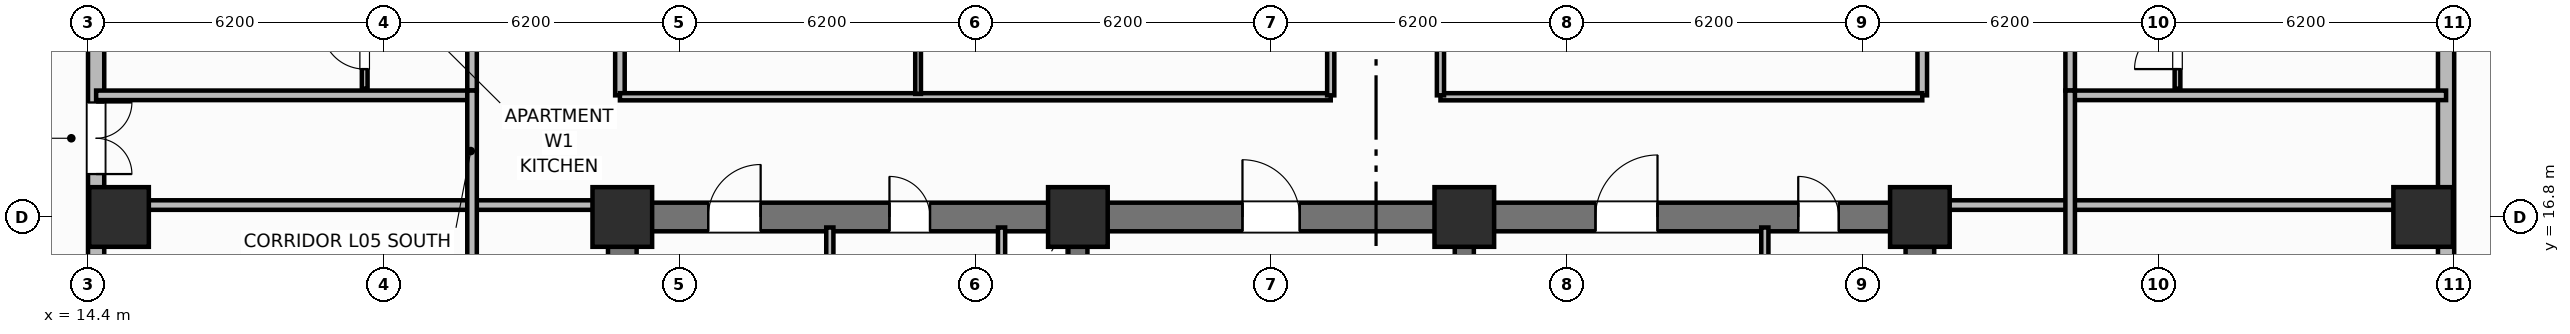
"""IFC4 building model, lengths in metres.
Left out: names, types, materials, properties, quantities, classifications, styles, units other than length and angle.
Written with IfcOpenShell. Run it as: python <this file> out.ifc"""

import sys

from ifc_helpers import new_model, si_unit, direction, frame, frame_2d, origin, origin_2d, place, context, subcontext, project, spatial, rectangle, extrude, element, fill, save


model = new_model("IFC4")
c1 = context("Model", 3, precision=1e-05, world=origin(), true_north=direction((0.0, 1.0)))
c2 = subcontext(c1, "Body", "Model", "MODEL_VIEW")
j1 = project(units=[si_unit("LENGTHUNIT", "METRE"), si_unit("PLANEANGLEUNIT", "RADIAN")], contexts=[c1])
p1 = place(None, origin())
s1 = spatial("IfcSite", under=j1, at=p1, CompositionType="ELEMENT")
p2 = place(p1, origin())
s2 = spatial("IfcBuilding", under=s1, at=p2, CompositionType="ELEMENT")
p3 = place(p2, frame((0.0, 0.0, 24.6)))
s3 = spatial("IfcBuildingStorey", under=s2, at=p3, CompositionType="ELEMENT", Elevation=24.6)
for number, where, z_axis, x_axis in (
    (1, (25.6, 10.9, 0.0), (0.0, 0.0, 1.0), (0.0, 1.0, 0.0)),
    (2, (52.8, 10.9, 0.0), (0.0, 0.0, 1.0), (0.0, 1.0, 0.0)),
):
    element("IfcWall", number, at=place(p3, frame(where, z_axis=z_axis, x_axis=x_axis)), inside=s3, PredefinedType="SHEAR", context=c2, shape_type="SweptSolid", body=[
        extrude(rectangle(XDim=5.6, YDim=0.6, at=frame_2d((2.8, 0.0))), origin(), (0.0, 0.0, 1.0), 4.2),
    ])
p4 = place(p3, frame((25.6, 16.8, 0.0), z_axis=(0.0, 0.0, 1.0), x_axis=(1.0, 0.0, 0.0)))
e3 = element("IfcWall", 3, at=p4, inside=s3, PredefinedType="SHEAR", context=c2, shape_type="SweptSolid", body=[
    extrude(rectangle(XDim=27.2, YDim=0.6, at=frame_2d((13.6, 0.0))), origin(), (0.0, 0.0, 1.0), 4.2),
])
p5 = place(p4, frame((1.8, 0.0, 0.0)))
e4 = element("IfcOpeningElement", 4, at=p5, cuts=e3, PredefinedType="OPENING", context=c2, shape_type="SweptSolid", body=[
    extrude(rectangle(XDim=1.1, YDim=2.15, at=frame_2d((0.55, 1.075))), frame((0.0, 0.31, 0.0), z_axis=(0.0, -1.0, 0.0), x_axis=(1.0, 0.0, 0.0)), (0.0, 0.0, 1.0), 0.62),
])
p6 = place(p4, frame((5.6, 0.0, 0.0)))
e5 = element("IfcOpeningElement", 5, at=p6, cuts=e3, PredefinedType="OPENING", context=c2, shape_type="SweptSolid", body=[
    extrude(rectangle(XDim=0.85, YDim=2.1, at=frame_2d((0.425, 1.05))), frame((0.0, 0.31, 0.0), z_axis=(0.0, -1.0, 0.0), x_axis=(1.0, 0.0, 0.0)), (0.0, 0.0, 1.0), 0.62),
])
p7 = place(p4, frame((13.0, 0.0, 0.0)))
e6 = element("IfcOpeningElement", 6, at=p7, cuts=e3, PredefinedType="OPENING", context=c2, shape_type="SweptSolid", body=[
    extrude(rectangle(XDim=1.2, YDim=2.15, at=frame_2d((0.6, 1.075))), frame((0.0, 0.31, 0.0), z_axis=(0.0, -1.0, 0.0), x_axis=(1.0, 0.0, 0.0)), (0.0, 0.0, 1.0), 0.62),
])
p8 = place(p4, frame((20.4, 0.0, 0.0)))
e7 = element("IfcOpeningElement", 7, at=p8, cuts=e3, PredefinedType="OPENING", context=c2, shape_type="SweptSolid", body=[
    extrude(rectangle(XDim=1.3, YDim=2.2, at=frame_2d((0.65, 1.1))), frame((0.0, 0.31, 0.0), z_axis=(0.0, -1.0, 0.0), x_axis=(1.0, 0.0, 0.0)), (0.0, 0.0, 1.0), 0.62),
])
p9 = place(p4, frame((24.65, 0.0, 0.0)))
e8 = element("IfcOpeningElement", 8, at=p9, cuts=e3, PredefinedType="OPENING", context=c2, shape_type="SweptSolid", body=[
    extrude(rectangle(XDim=0.85, YDim=2.1, at=frame_2d((0.425, 1.05))), frame((0.0, 0.31, 0.0), z_axis=(0.0, -1.0, 0.0), x_axis=(1.0, 0.0, 0.0)), (0.0, 0.0, 1.0), 0.62),
])
for number, where, z_axis, x_axis in (
    (9, (35.15, 10.9, 0.0), (0.0, 0.0, 1.0), (0.0, 1.0, 0.0)),
    (10, (43.25, 10.9, 0.0), (0.0, 0.0, 1.0), (0.0, 1.0, 0.0)),
):
    element("IfcWall", number, at=place(p3, frame(where, z_axis=z_axis, x_axis=x_axis)), inside=s3, PredefinedType="SHEAR", context=c2, shape_type="SweptSolid", body=[
        extrude(rectangle(XDim=5.6, YDim=0.4, at=frame_2d((2.8, 0.0))), origin(), (0.0, 0.0, 1.0), 4.2),
    ])
for number, where, z_axis, x_axis in (
    (11, (25.6, 16.8, 0.0), (0.0, 0.0, 1.0), (1.0, 0.0, 0.0)),
    (12, (35.15, 16.8, 0.0), (0.0, 0.0, 1.0), (1.0, 0.0, 0.0)),
    (13, (43.25, 16.8, 0.0), (0.0, 0.0, 1.0), (1.0, 0.0, 0.0)),
    (14, (52.8, 16.8, 0.0), (0.0, 0.0, 1.0), (1.0, 0.0, 0.0)),
    (15, (15.05, 16.8, 0.0), (0.0, 0.0, 1.0), (1.0, 0.0, 0.0)),
    (16, (63.35, 16.8, 0.0), (0.0, 0.0, 1.0), (1.0, 0.0, 0.0)),
):
    element("IfcColumn", number, at=place(p3, frame(where, z_axis=z_axis, x_axis=x_axis)), inside=s3, PredefinedType="COLUMN", context=c2, shape_type="SweptSolid", body=[
        extrude(rectangle(XDim=1.25, YDim=1.25, at=origin_2d()), origin(), (0.0, 0.0, 1.0), 4.2),
    ])
p10 = place(p3, frame((63.83, 9.0, 0.0), z_axis=(0.0, 0.0, 1.0), x_axis=(0.0, 1.0, 0.0)))
e17 = element("IfcWall", 17, at=p10, inside=s3, PredefinedType="SOLIDWALL", context=c2, shape_type="SweptSolid", body=[
    extrude(rectangle(XDim=14.8, YDim=0.34, at=frame_2d((7.4, 0.0))), origin(), (0.0, 0.0, 1.0), 3.2),
])
p11 = place(p10, frame((4.913, 0.0, 0.85)))
e18 = element("IfcOpeningElement", 18, at=p11, cuts=e17, PredefinedType="OPENING", context=c2, shape_type="SweptSolid", body=[
    extrude(rectangle(XDim=1.6, YDim=1.9, at=frame_2d((0.8, 0.95))), frame((0.0, 0.18, 0.0), z_axis=(0.0, -1.0, 0.0), x_axis=(1.0, 0.0, 0.0)), (0.0, 0.0, 1.0), 0.36),
])
p12 = place(p10, frame((11.663, 0.0, 0.85)))
e19 = element("IfcOpeningElement", 19, at=p12, cuts=e17, PredefinedType="OPENING", context=c2, shape_type="SweptSolid", body=[
    extrude(rectangle(XDim=1.6, YDim=1.9, at=frame_2d((0.8, 0.95))), frame((0.0, 0.18, 0.0), z_axis=(0.0, -1.0, 0.0), x_axis=(1.0, 0.0, 0.0)), (0.0, 0.0, 1.0), 0.36),
])
p13 = place(p3, frame((14.57, 23.8, 0.0), z_axis=(0.0, 0.0, 1.0), x_axis=(0.0, -1.0, 0.0)))
e20 = element("IfcWall", 20, at=p13, inside=s3, PredefinedType="SOLIDWALL", context=c2, shape_type="SweptSolid", body=[
    extrude(rectangle(XDim=14.8, YDim=0.34, at=frame_2d((7.4, 0.0))), origin(), (0.0, 0.0, 1.0), 3.2),
])
p14 = place(p13, frame((1.438, 0.0, 0.85)))
e21 = element("IfcOpeningElement", 21, at=p14, cuts=e20, PredefinedType="OPENING", context=c2, shape_type="SweptSolid", body=[
    extrude(rectangle(XDim=1.8, YDim=1.85, at=frame_2d((0.9, 0.925))), frame((0.0, 0.18, 0.0), z_axis=(0.0, -1.0, 0.0), x_axis=(1.0, 0.0, 0.0)), (0.0, 0.0, 1.0), 0.36),
])
p15 = place(p13, frame((4.6, 0.0, 0.0)))
e22 = element("IfcOpeningElement", 22, at=p15, cuts=e20, PredefinedType="OPENING", context=c2, shape_type="SweptSolid", body=[
    extrude(rectangle(XDim=1.5, YDim=2.1, at=frame_2d((0.75, 1.05))), frame((0.0, 0.18, 0.0), z_axis=(0.0, -1.0, 0.0), x_axis=(1.0, 0.0, 0.0)), (0.0, 0.0, 1.0), 0.36),
])
p16 = place(p13, frame((8.538, 0.0, 0.85)))
e23 = element("IfcOpeningElement", 23, at=p16, cuts=e20, PredefinedType="OPENING", context=c2, shape_type="SweptSolid", body=[
    extrude(rectangle(XDim=1.8, YDim=1.85, at=frame_2d((0.9, 0.925))), frame((0.0, 0.18, 0.0), z_axis=(0.0, -1.0, 0.0), x_axis=(1.0, 0.0, 0.0)), (0.0, 0.0, 1.0), 0.36),
])
p17 = place(p3, frame((29.95, 14.5, 0.0), z_axis=(0.0, 0.0, 1.0), x_axis=(0.0, 1.0, 0.0)))
e24 = element("IfcWall", 24, at=p17, inside=s3, PredefinedType="PARTITIONING", context=c2, shape_type="SweptSolid", body=[
    extrude(rectangle(XDim=2.08, YDim=0.15, at=frame_2d((1.04, 0.0))), origin(), (0.0, 0.0, 1.0), 3.03),
])
p18 = place(p3, frame((33.55, 14.5, 0.0), z_axis=(0.0, 0.0, 1.0), x_axis=(0.0, 1.0, 0.0)))
e25 = element("IfcWall", 25, at=p18, inside=s3, PredefinedType="PARTITIONING", context=c2, shape_type="SweptSolid", body=[
    extrude(rectangle(XDim=2.08, YDim=0.15, at=frame_2d((1.04, 0.0))), origin(), (0.0, 0.0, 1.0), 3.03),
])
p19 = place(p18, frame((0.55, 0.0, 0.0)))
e26 = element("IfcOpeningElement", 26, at=p19, cuts=e25, PredefinedType="OPENING", context=c2, shape_type="SweptSolid", body=[
    extrude(rectangle(XDim=0.85, YDim=2.05, at=frame_2d((0.425, 1.025))), frame((0.0, 0.085, 0.0), z_axis=(0.0, -1.0, 0.0), x_axis=(1.0, 0.0, 0.0)), (0.0, 0.0, 1.0), 0.17),
])
p20 = place(p3, frame((49.55, 13.7, 0.0), z_axis=(0.0, 0.0, 1.0), x_axis=(0.0, 1.0, 0.0)))
e27 = element("IfcWall", 27, at=p20, inside=s3, PredefinedType="PARTITIONING", context=c2, shape_type="SweptSolid", body=[
    extrude(rectangle(XDim=2.88, YDim=0.15, at=frame_2d((1.44, 0.0))), origin(), (0.0, 0.0, 1.0), 3.03),
])
for number, where, z_axis, x_axis in (
    (28, (25.55, 19.35, 0.0), (0.0, 0.0, 1.0), (0.0, 1.0, 0.0)),
    (29, (52.85, 19.35, 0.0), (0.0, 0.0, 1.0), (0.0, 1.0, 0.0)),
):
    element("IfcWall", number, at=place(p3, frame(where, z_axis=z_axis, x_axis=x_axis)), inside=s3, PredefinedType="PARTITIONING", context=c2, shape_type="SweptSolid", body=[
        extrude(rectangle(XDim=18.42, YDim=0.2, at=frame_2d((9.21, 0.0))), origin(), (0.0, 0.0, 1.0), 3.03),
    ])
p21 = place(p3, frame((14.57, 17.05, 0.0), z_axis=(0.0, 0.0, 1.0), x_axis=(1.0, 0.0, 0.0)))
e30 = element("IfcWall", 30, at=p21, inside=s3, PredefinedType="PARTITIONING", context=c2, shape_type="SweptSolid", body=[
    extrude(rectangle(XDim=10.73, YDim=0.2, at=frame_2d((5.365, 0.0))), origin(), (0.0, 0.0, 1.0), 3.03),
])
p22 = place(p3, frame((14.57, 19.35, 0.0), z_axis=(0.0, 0.0, 1.0), x_axis=(1.0, 0.0, 0.0)))
e31 = element("IfcWall", 31, at=p22, inside=s3, PredefinedType="PARTITIONING", context=c2, shape_type="SweptSolid", body=[
    extrude(rectangle(XDim=7.88, YDim=0.2, at=frame_2d((3.94, 0.0))), origin(), (0.0, 0.0, 1.0), 3.03),
])
p23 = place(p3, frame((53.1, 17.05, 0.0), z_axis=(0.0, 0.0, 1.0), x_axis=(1.0, 0.0, 0.0)))
e32 = element("IfcWall", 32, at=p23, inside=s3, PredefinedType="PARTITIONING", context=c2, shape_type="SweptSolid", body=[
    extrude(rectangle(XDim=10.73, YDim=0.2, at=frame_2d((5.365, 0.0))), origin(), (0.0, 0.0, 1.0), 3.03),
])
p24 = place(p3, frame((55.95, 19.35, 0.0), z_axis=(0.0, 0.0, 1.0), x_axis=(1.0, 0.0, 0.0)))
e33 = element("IfcWall", 33, at=p24, inside=s3, PredefinedType="PARTITIONING", context=c2, shape_type="SweptSolid", body=[
    extrude(rectangle(XDim=7.88, YDim=0.2, at=frame_2d((3.94, 0.0))), origin(), (0.0, 0.0, 1.0), 3.03),
])
p25 = place(p3, frame((25.55, 19.32, 0.0), z_axis=(0.0, 0.0, 1.0), x_axis=(1.0, 0.0, 0.0)))
e34 = element("IfcWall", 34, at=p25, inside=s3, PredefinedType="PARTITIONING", context=c2, shape_type="SweptSolid", body=[
    extrude(rectangle(XDim=14.9, YDim=0.15, at=frame_2d((7.45, 0.0))), origin(), (0.0, 0.0, 1.0), 3.03),
])
p26 = place(p3, frame((42.75, 19.32, 0.0), z_axis=(0.0, 0.0, 1.0), x_axis=(1.0, 0.0, 0.0)))
e35 = element("IfcWall", 35, at=p26, inside=s3, PredefinedType="PARTITIONING", context=c2, shape_type="SweptSolid", body=[
    extrude(rectangle(XDim=10.1, YDim=0.15, at=frame_2d((5.05, 0.0))), origin(), (0.0, 0.0, 1.0), 3.03),
])
p27 = place(p3, frame((31.8, 19.38, 0.0), z_axis=(0.0, 0.0, 1.0), x_axis=(0.0, 1.0, 0.0)))
e36 = element("IfcWall", 36, at=p27, inside=s3, PredefinedType="PARTITIONING", context=c2, shape_type="SweptSolid", body=[
    extrude(rectangle(XDim=8.77, YDim=0.12, at=frame_2d((4.385, 0.0))), origin(), (0.0, 0.0, 1.0), 3.03),
])
p28 = place(p27, frame((2.2, 0.0, 0.0)))
e37 = element("IfcOpeningElement", 37, at=p28, cuts=e36, PredefinedType="OPENING", context=c2, shape_type="SweptSolid", body=[
    extrude(rectangle(XDim=0.9, YDim=2.1, at=frame_2d((0.45, 1.05))), frame((0.0, 0.07, 0.0), z_axis=(0.0, -1.0, 0.0), x_axis=(1.0, 0.0, 0.0)), (0.0, 0.0, 1.0), 0.14),
])
p29 = place(p3, frame((40.45, 19.35, 0.0), z_axis=(0.0, 0.0, 1.0), x_axis=(0.0, 1.0, 0.0)))
e38 = element("IfcWall", 38, at=p29, inside=s3, PredefinedType="PARTITIONING", context=c2, shape_type="SweptSolid", body=[
    extrude(rectangle(XDim=18.42, YDim=0.15, at=frame_2d((9.21, 0.0))), origin(), (0.0, 0.0, 1.0), 3.03),
])
p30 = place(p29, frame((2.4, 0.0, 0.0)))
e39 = element("IfcOpeningElement", 39, at=p30, cuts=e38, PredefinedType="OPENING", context=c2, shape_type="SweptSolid", body=[
    extrude(rectangle(XDim=1.0, YDim=2.15, at=frame_2d((0.5, 1.075))), frame((0.0, 0.085, 0.0), z_axis=(0.0, -1.0, 0.0), x_axis=(1.0, 0.0, 0.0)), (0.0, 0.0, 1.0), 0.17),
])
p31 = place(p29, frame((11.4, 0.0, 0.0)))
e40 = element("IfcOpeningElement", 40, at=p31, cuts=e38, PredefinedType="OPENING", context=c2, shape_type="SweptSolid", body=[
    extrude(rectangle(XDim=1.0, YDim=2.15, at=frame_2d((0.5, 1.075))), frame((0.0, 0.085, 0.0), z_axis=(0.0, -1.0, 0.0), x_axis=(1.0, 0.0, 0.0)), (0.0, 0.0, 1.0), 0.17),
])
p32 = place(p3, frame((42.75, 19.35, 0.0), z_axis=(0.0, 0.0, 1.0), x_axis=(0.0, 1.0, 0.0)))
e41 = element("IfcWall", 41, at=p32, inside=s3, PredefinedType="PARTITIONING", context=c2, shape_type="SweptSolid", body=[
    extrude(rectangle(XDim=18.42, YDim=0.15, at=frame_2d((9.21, 0.0))), origin(), (0.0, 0.0, 1.0), 3.03),
])
p33 = place(p32, frame((5.5, 0.0, 0.0)))
e42 = element("IfcOpeningElement", 42, at=p33, cuts=e41, PredefinedType="OPENING", context=c2, shape_type="SweptSolid", body=[
    extrude(rectangle(XDim=1.0, YDim=2.15, at=frame_2d((0.5, 1.075))), frame((0.0, 0.085, 0.0), z_axis=(0.0, -1.0, 0.0), x_axis=(1.0, 0.0, 0.0)), (0.0, 0.0, 1.0), 0.17),
])
p34 = place(p3, frame((20.2, 19.49, 0.0), z_axis=(0.0, 0.0, 1.0), x_axis=(0.0, 1.0, 0.0)))
e43 = element("IfcWall", 43, at=p34, inside=s3, PredefinedType="PARTITIONING", context=c2, shape_type="SweptSolid", body=[
    extrude(rectangle(XDim=13.095, YDim=0.12, at=frame_2d((6.547, 0.0))), origin(), (0.0, 0.0, 1.0), 3.03),
])
p35 = place(p34, frame((0.41, 0.0, 0.0)))
e44 = element("IfcOpeningElement", 44, at=p35, cuts=e43, PredefinedType="OPENING", context=c2, shape_type="SweptSolid", body=[
    extrude(rectangle(XDim=0.9, YDim=2.1, at=frame_2d((0.45, 1.05))), frame((0.0, 0.07, 0.0), z_axis=(0.0, -1.0, 0.0), x_axis=(1.0, 0.0, 0.0)), (0.0, 0.0, 1.0), 0.14),
])
p36 = place(p34, frame((11.36, 0.0, 0.0)))
e45 = element("IfcOpeningElement", 45, at=p36, cuts=e43, PredefinedType="OPENING", context=c2, shape_type="SweptSolid", body=[
    extrude(rectangle(XDim=0.82, YDim=2.08, at=frame_2d((0.41, 1.04))), frame((0.0, 0.07, 0.0), z_axis=(0.0, -1.0, 0.0), x_axis=(1.0, 0.0, 0.0)), (0.0, 0.0, 1.0), 0.14),
])
p37 = place(p3, frame((22.45, 19.45, 0.0), z_axis=(0.0, 0.0, 1.0), x_axis=(0.0, 1.0, 0.0)))
e46 = element("IfcWall", 46, at=p37, inside=s3, PredefinedType="PARTITIONING", context=c2, shape_type="SweptSolid", body=[
    extrude(rectangle(XDim=26.35, YDim=0.2, at=frame_2d((13.175, 0.0))), origin(), (0.0, 0.0, 1.0), 3.03),
])
p38 = place(p37, frame((2.5, 0.0, 0.0)))
e47 = element("IfcOpeningElement", 47, at=p38, cuts=e46, PredefinedType="OPENING", context=c2, shape_type="SweptSolid", body=[
    extrude(rectangle(XDim=1.0, YDim=2.15, at=frame_2d((0.5, 1.075))), frame((0.0, 0.11, 0.0), z_axis=(0.0, -1.0, 0.0), x_axis=(1.0, 0.0, 0.0)), (0.0, 0.0, 1.0), 0.22),
])
p39 = place(p37, frame((13.875, 0.0, 0.0)))
e48 = element("IfcOpeningElement", 48, at=p39, cuts=e46, PredefinedType="OPENING", context=c2, shape_type="SweptSolid", body=[
    extrude(rectangle(XDim=1.0, YDim=2.15, at=frame_2d((0.5, 1.075))), frame((0.0, 0.11, 0.0), z_axis=(0.0, -1.0, 0.0), x_axis=(1.0, 0.0, 0.0)), (0.0, 0.0, 1.0), 0.22),
])
p40 = place(p3, frame((58.2, 19.49, 0.0), z_axis=(0.0, 0.0, 1.0), x_axis=(0.0, 1.0, 0.0)))
e49 = element("IfcWall", 49, at=p40, inside=s3, PredefinedType="PARTITIONING", context=c2, shape_type="SweptSolid", body=[
    extrude(rectangle(XDim=13.095, YDim=0.12, at=frame_2d((6.547, 0.0))), origin(), (0.0, 0.0, 1.0), 3.03),
])
p41 = place(p40, frame((0.41, 0.0, 0.0)))
e50 = element("IfcOpeningElement", 50, at=p41, cuts=e49, PredefinedType="OPENING", context=c2, shape_type="SweptSolid", body=[
    extrude(rectangle(XDim=0.9, YDim=2.1, at=frame_2d((0.45, 1.05))), frame((0.0, 0.07, 0.0), z_axis=(0.0, -1.0, 0.0), x_axis=(1.0, 0.0, 0.0)), (0.0, 0.0, 1.0), 0.14),
])
p42 = place(p40, frame((11.36, 0.0, 0.0)))
e51 = element("IfcOpeningElement", 51, at=p42, cuts=e49, PredefinedType="OPENING", context=c2, shape_type="SweptSolid", body=[
    extrude(rectangle(XDim=0.82, YDim=2.08, at=frame_2d((0.41, 1.04))), frame((0.0, 0.07, 0.0), z_axis=(0.0, -1.0, 0.0), x_axis=(1.0, 0.0, 0.0)), (0.0, 0.0, 1.0), 0.14),
])
p43 = place(p3, frame((55.95, 19.45, 0.0), z_axis=(0.0, 0.0, 1.0), x_axis=(0.0, 1.0, 0.0)))
e52 = element("IfcWall", 52, at=p43, inside=s3, PredefinedType="PARTITIONING", context=c2, shape_type="SweptSolid", body=[
    extrude(rectangle(XDim=26.35, YDim=0.2, at=frame_2d((13.175, 0.0))), origin(), (0.0, 0.0, 1.0), 3.03),
])
p44 = place(p43, frame((2.5, 0.0, 0.0)))
e53 = element("IfcOpeningElement", 53, at=p44, cuts=e52, PredefinedType="OPENING", context=c2, shape_type="SweptSolid", body=[
    extrude(rectangle(XDim=1.0, YDim=2.15, at=frame_2d((0.5, 1.075))), frame((0.0, 0.11, 0.0), z_axis=(0.0, -1.0, 0.0), x_axis=(1.0, 0.0, 0.0)), (0.0, 0.0, 1.0), 0.22),
])
p45 = place(p43, frame((13.875, 0.0, 0.0)))
e54 = element("IfcOpeningElement", 54, at=p45, cuts=e52, PredefinedType="OPENING", context=c2, shape_type="SweptSolid", body=[
    extrude(rectangle(XDim=1.0, YDim=2.15, at=frame_2d((0.5, 1.075))), frame((0.0, 0.11, 0.0), z_axis=(0.0, -1.0, 0.0), x_axis=(1.0, 0.0, 0.0)), (0.0, 0.0, 1.0), 0.22),
])
for number, where, z_axis, x_axis in (
    (55, (22.45, 4.97, 0.0), (0.0, 0.0, 1.0), (0.0, 1.0, 0.0)),
    (56, (55.95, 4.97, 0.0), (0.0, 0.0, 1.0), (0.0, 1.0, 0.0)),
):
    element("IfcWall", number, at=place(p3, frame(where, z_axis=z_axis, x_axis=x_axis)), inside=s3, PredefinedType="PARTITIONING", context=c2, shape_type="SweptSolid", body=[
        extrude(rectangle(XDim=14.48, YDim=0.2, at=frame_2d((7.24, 0.0))), origin(), (0.0, 0.0, 1.0), 3.03),
    ])
p46 = place(p15, origin())
e57 = element("IfcDoor", 57, at=p46, inside=s3, OperationType="DOUBLE_DOOR_SINGLE_SWING", PredefinedType="DOOR", context=c2, shape_type="SweptSolid", body=[
    extrude(rectangle(XDim=1.5, YDim=2.1, at=frame_2d((0.75, 1.05))), frame((0.0, 0.025, 0.0), z_axis=(0.0, -1.0, 0.0), x_axis=(1.0, 0.0, 0.0)), (0.0, 0.0, 1.0), 0.05),
])
fill(e22, e57)
p47 = place(p35, origin())
e58 = element("IfcDoor", 58, at=p47, inside=s3, OperationType="SINGLE_SWING_RIGHT", PredefinedType="DOOR", context=c2, shape_type="SweptSolid", body=[
    extrude(rectangle(XDim=0.9, YDim=2.1, at=frame_2d((0.45, 1.05))), frame((0.0, 0.025, 0.0), z_axis=(0.0, -1.0, 0.0), x_axis=(1.0, 0.0, 0.0)), (0.0, 0.0, 1.0), 0.05),
])
fill(e44, e58)
p48 = place(p41, origin())
e59 = element("IfcDoor", 59, at=p48, inside=s3, OperationType="SINGLE_SWING_LEFT", PredefinedType="DOOR", context=c2, shape_type="SweptSolid", body=[
    extrude(rectangle(XDim=0.9, YDim=2.1, at=frame_2d((0.45, 1.05))), frame((0.0, 0.025, 0.0), z_axis=(0.0, -1.0, 0.0), x_axis=(1.0, 0.0, 0.0)), (0.0, 0.0, 1.0), 0.05),
])
fill(e50, e59)
p49 = place(p5, origin())
e60 = element("IfcDoor", 60, at=p49, inside=s3, OperationType="SINGLE_SWING_RIGHT", PredefinedType="DOOR", context=c2, shape_type="SweptSolid", body=[
    extrude(rectangle(XDim=1.1, YDim=2.15, at=frame_2d((0.55, 1.075))), frame((0.0, 0.025, 0.0), z_axis=(0.0, -1.0, 0.0), x_axis=(1.0, 0.0, 0.0)), (0.0, 0.0, 1.0), 0.05),
])
fill(e4, e60)
p50 = place(p6, origin())
e61 = element("IfcDoor", 61, at=p50, inside=s3, OperationType="SINGLE_SWING_LEFT", PredefinedType="DOOR", context=c2, shape_type="SweptSolid", body=[
    extrude(rectangle(XDim=0.85, YDim=2.1, at=frame_2d((0.425, 1.05))), frame((0.0, 0.025, 0.0), z_axis=(0.0, -1.0, 0.0), x_axis=(1.0, 0.0, 0.0)), (0.0, 0.0, 1.0), 0.05),
])
fill(e5, e61)
p51 = place(p7, origin())
e62 = element("IfcDoor", 62, at=p51, inside=s3, OperationType="SINGLE_SWING_LEFT", PredefinedType="DOOR", context=c2, shape_type="SweptSolid", body=[
    extrude(rectangle(XDim=1.2, YDim=2.15, at=frame_2d((0.6, 1.075))), frame((0.0, 0.025, 0.0), z_axis=(0.0, -1.0, 0.0), x_axis=(1.0, 0.0, 0.0)), (0.0, 0.0, 1.0), 0.05),
])
fill(e6, e62)
p52 = place(p8, origin())
e63 = element("IfcDoor", 63, at=p52, inside=s3, OperationType="SINGLE_SWING_RIGHT", PredefinedType="DOOR", context=c2, shape_type="SweptSolid", body=[
    extrude(rectangle(XDim=1.3, YDim=2.2, at=frame_2d((0.65, 1.1))), frame((0.0, 0.025, 0.0), z_axis=(0.0, -1.0, 0.0), x_axis=(1.0, 0.0, 0.0)), (0.0, 0.0, 1.0), 0.05),
])
fill(e7, e63)
p53 = place(p9, origin())
e64 = element("IfcDoor", 64, at=p53, inside=s3, OperationType="SINGLE_SWING_LEFT", PredefinedType="DOOR", context=c2, shape_type="SweptSolid", body=[
    extrude(rectangle(XDim=0.85, YDim=2.1, at=frame_2d((0.425, 1.05))), frame((0.0, 0.025, 0.0), z_axis=(0.0, -1.0, 0.0), x_axis=(1.0, 0.0, 0.0)), (0.0, 0.0, 1.0), 0.05),
])
fill(e8, e64)
save(model, sys.argv[1])
